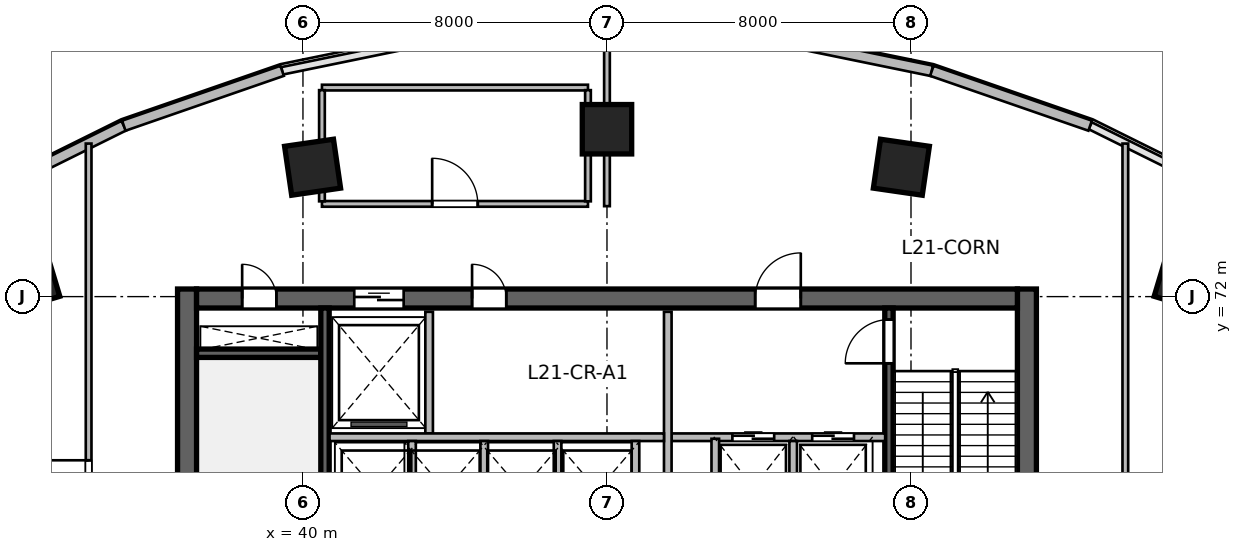
"""IFC4 building model, lengths in metres.
Left out: names, types, materials, properties, quantities, classifications, styles, units other than length and angle.
Written with IfcOpenShell. Run it as: python <this file> out.ifc"""

import sys

from ifc_helpers import new_model, si_unit, direction, frame, frame_2d, origin, origin_2d, place, context, subcontext, project, spatial, rectangle, extrude, source, transform, mapped, element, fill, save


model = new_model("IFC4")
c1 = context("Model", 3, precision=1e-05, world=origin(), true_north=direction((0.0, 1.0)))
c2 = subcontext(c1, "Body", "Model", "MODEL_VIEW")
j1 = project(units=[si_unit("LENGTHUNIT", "METRE"), si_unit("PLANEANGLEUNIT", "RADIAN")], contexts=[c1])
p1 = place(None, origin())
s1 = spatial("IfcSite", under=j1, at=p1, CompositionType="ELEMENT")
p2 = place(p1, origin())
s2 = spatial("IfcBuilding", under=s1, at=p2, CompositionType="ELEMENT")
p3 = place(p2, frame((0.0, 0.0, 91.2)))
s3 = spatial("IfcBuildingStorey", under=s2, at=p3, CompositionType="ELEMENT", Elevation=91.2)
m1 = source(origin(), c2, "Body", "SweptSolid", [
    extrude(rectangle(XDim=12.0, YDim=0.5, at=frame_2d((6.0, 0.0))), origin(), (0.0, 0.0, 1.0), 4.8),
])
for number, where, z_axis, x_axis in (
    (1, (36.95, 60.2, 0.0), (0.0, 0.0, 1.0), (0.0, 1.0, 0.0)),
    (2, (59.05, 60.2, 0.0), (0.0, 0.0, 1.0), (0.0, 1.0, 0.0)),
):
    element("IfcWall", number, at=place(p3, frame(where, z_axis=z_axis, x_axis=x_axis)), inside=s3, PredefinedType="SHEAR", context=c2, shape_type="MappedRepresentation", body=[
        mapped(m1, transform((0.0, 0.0, 0.0), scale=1.0)),
    ])
m2 = source(origin(), c2, "Body", "SweptSolid", [
    extrude(rectangle(XDim=21.6, YDim=0.5, at=frame_2d((10.8, 0.0))), origin(), (0.0, 0.0, 1.0), 4.8),
])
p4 = place(p3, frame((37.2, 71.95, 0.0), z_axis=(0.0, 0.0, 1.0), x_axis=(1.0, 0.0, 0.0)))
e3 = element("IfcWall", 3, at=p4, inside=s3, PredefinedType="SHEAR", context=c2, shape_type="MappedRepresentation", body=[
    mapped(m2, transform((0.0, 0.0, 0.0), scale=1.0)),
])
p5 = place(p4, frame((1.2, 0.0, 0.0)))
e4 = element("IfcOpeningElement", 4, at=p5, cuts=e3, PredefinedType="OPENING", context=c2, shape_type="SweptSolid", body=[
    extrude(rectangle(XDim=0.9, YDim=2.1, at=frame_2d((0.45, 1.05))), frame((0.0, 0.26, 0.0), z_axis=(0.0, -1.0, 0.0), x_axis=(1.0, 0.0, 0.0)), (0.0, 0.0, 1.0), 0.52),
])
p6 = place(p4, frame((14.7, 0.0, 0.0)))
e5 = element("IfcOpeningElement", 5, at=p6, cuts=e3, PredefinedType="OPENING", context=c2, shape_type="SweptSolid", body=[
    extrude(rectangle(XDim=1.2, YDim=2.15, at=frame_2d((0.6, 1.075))), frame((0.0, 0.26, 0.0), z_axis=(0.0, -1.0, 0.0), x_axis=(1.0, 0.0, 0.0)), (0.0, 0.0, 1.0), 0.52),
])
p7 = place(p4, frame((4.15, 0.0, 0.0)))
e6 = element("IfcOpeningElement", 6, at=p7, cuts=e3, PredefinedType="OPENING", context=c2, shape_type="SweptSolid", body=[
    extrude(rectangle(XDim=1.3, YDim=2.15, at=frame_2d((0.65, 1.075))), frame((0.0, 0.26, 0.0), z_axis=(0.0, -1.0, 0.0), x_axis=(1.0, 0.0, 0.0)), (0.0, 0.0, 1.0), 0.52),
])
p8 = place(p4, frame((7.25, 0.0, 0.0)))
e7 = element("IfcOpeningElement", 7, at=p8, cuts=e3, PredefinedType="OPENING", context=c2, shape_type="SweptSolid", body=[
    extrude(rectangle(XDim=0.9, YDim=2.1, at=frame_2d((0.45, 1.05))), frame((0.0, 0.26, 0.0), z_axis=(0.0, -1.0, 0.0), x_axis=(1.0, 0.0, 0.0)), (0.0, 0.0, 1.0), 0.52),
])
m3 = source(origin(), c2, "Body", "SweptSolid", [
    extrude(rectangle(XDim=3.27, YDim=0.22, at=frame_2d((1.635, 0.0))), origin(), (0.0, 0.0, 1.0), 4.8),
])
p9 = place(p3, frame((37.2, 70.51, 0.0), z_axis=(0.0, 0.0, 1.0), x_axis=(1.0, 0.0, 0.0)))
e8 = element("IfcWall", 8, at=p9, inside=s3, PredefinedType="SHEAR", context=c2, shape_type="MappedRepresentation", body=[
    mapped(m3, transform((0.0, 0.0, 0.0), scale=1.0)),
])
m4 = source(origin(), c2, "Body", "SweptSolid", [
    extrude(rectangle(XDim=11.0, YDim=0.22, at=frame_2d((5.5, 0.0))), origin(), (0.0, 0.0, 1.0), 4.8),
])
p10 = place(p3, frame((40.58, 60.7, 0.0), z_axis=(0.0, 0.0, 1.0), x_axis=(0.0, 1.0, 0.0)))
e9 = element("IfcWall", 9, at=p10, inside=s3, PredefinedType="SHEAR", context=c2, shape_type="MappedRepresentation", body=[
    mapped(m4, transform((0.0, 0.0, 0.0), scale=1.0)),
])
p11 = place(p3, frame((55.42, 60.7, 0.0), z_axis=(0.0, 0.0, 1.0), x_axis=(0.0, 1.0, 0.0)))
e10 = element("IfcWall", 10, at=p11, inside=s3, PredefinedType="SHEAR", context=c2, shape_type="MappedRepresentation", body=[
    mapped(m4, transform((0.0, 0.0, 0.0), scale=1.0)),
])
p12 = place(p11, frame((9.545, 0.0, 0.0)))
e11 = element("IfcOpeningElement", 11, at=p12, cuts=e10, PredefinedType="OPENING", context=c2, shape_type="SweptSolid", body=[
    extrude(rectangle(XDim=1.15, YDim=2.15, at=frame_2d((0.575, 1.075))), frame((0.0, 0.12, 0.0), z_axis=(0.0, -1.0, 0.0), x_axis=(1.0, 0.0, 0.0)), (0.0, 0.0, 1.0), 0.24),
])
m5 = source(origin(), c2, "Body", "SweptSolid", [
    extrude(rectangle(XDim=1.3, YDim=1.3, at=origin_2d()), origin(), (0.0, 0.0, 1.0), 4.8),
])
for number, where, z_axis, x_axis in (
    (12, (32.791, 72.442, 0.0), (0.0, 0.0, 1.0), (-0.289, 0.957, 0.0)),
    (13, (40.253, 75.404, 0.0), (0.0, 0.0, 1.0), (-0.143, 0.99, 0.0)),
    (14, (48.0, 76.404, 0.0), (0.0, 0.0, 1.0), (0.0, 1.0, 0.0)),
    (15, (55.747, 75.404, 0.0), (0.0, 0.0, 1.0), (0.143, 0.99, 0.0)),
    (16, (63.209, 72.442, 0.0), (0.0, 0.0, 1.0), (0.289, 0.957, 0.0)),
):
    element("IfcColumn", number, at=place(p3, frame(where, z_axis=z_axis, x_axis=x_axis)), inside=s3, PredefinedType="COLUMN", context=c2, shape_type="MappedRepresentation", body=[
        mapped(m5, transform((0.0, 0.0, 0.0), scale=1.0)),
    ])
m6 = source(origin(), c2, "Body", "SweptSolid", [
    extrude(rectangle(XDim=4.506, YDim=0.28, at=frame_2d((2.253, 0.0))), origin(), (0.0, 0.0, 1.0), 4.55),
])
p13 = place(p3, frame((31.249, 74.496, 0.0), z_axis=(0.0, 0.0, 1.0), x_axis=(0.89597155075, 0.444111450254, 0.0)))
e17 = element("IfcWall", 17, at=p13, inside=s3, PredefinedType="SOLIDWALL", context=c2, shape_type="MappedRepresentation", body=[
    mapped(m6, transform((0.0, 0.0, 0.0), scale=1.0)),
])
m7 = source(origin(), c2, "Body", "SweptSolid", [
    extrude(rectangle(XDim=4.409, YDim=0.28, at=frame_2d((2.205, 0.0))), origin(), (0.0, 0.0, 1.0), 4.55),
])
p14 = place(p3, frame((35.286, 76.497, 0.0), z_axis=(0.0, 0.0, 1.0), x_axis=(0.944879374121, 0.327418643881, 0.0)))
e18 = element("IfcWall", 18, at=p14, inside=s3, PredefinedType="SOLIDWALL", context=c2, shape_type="MappedRepresentation", body=[
    mapped(m7, transform((0.0, 0.0, 0.0), scale=1.0)),
])
m8 = source(origin(), c2, "Body", "SweptSolid", [
    extrude(rectangle(XDim=4.341, YDim=0.28, at=frame_2d((2.17, 0.0))), origin(), (0.0, 0.0, 1.0), 4.55),
])
p15 = place(p3, frame((52.296, 78.813, 0.0), z_axis=(0.0, 0.0, 1.0), x_axis=(0.979612918634, -0.20089432457, 0.0)))
e19 = element("IfcWall", 19, at=p15, inside=s3, PredefinedType="SOLIDWALL", context=c2, shape_type="MappedRepresentation", body=[
    mapped(m8, transform((0.0, 0.0, 0.0), scale=1.0)),
])
p16 = place(p3, frame((56.548, 77.941, 0.0), z_axis=(0.0, 0.0, 1.0), x_axis=(0.944879374121, -0.327418643881, 0.0)))
e20 = element("IfcWall", 20, at=p16, inside=s3, PredefinedType="SOLIDWALL", context=c2, shape_type="MappedRepresentation", body=[
    mapped(m7, transform((0.0, 0.0, 0.0), scale=1.0)),
])
m9 = source(origin(), c2, "Body", "SweptSolid", [
    extrude(rectangle(XDim=5.62, YDim=0.2, at=frame_2d((2.81, 0.0))), origin(), (0.0, 0.0, 1.0), 4.55),
])
p17 = place(p3, frame((49.7, 68.3, 0.0), z_axis=(0.0, 0.0, 1.0), x_axis=(1.0, 0.0, 0.0)))
e21 = element("IfcWall", 21, at=p17, inside=s3, PredefinedType="SOLIDWALL", context=c2, shape_type="MappedRepresentation", body=[
    mapped(m9, transform((0.0, 0.0, 0.0), scale=1.0)),
])
p18 = place(p17, frame((1.6, 0.0, 0.0)))
e22 = element("IfcOpeningElement", 22, at=p18, cuts=e21, PredefinedType="OPENING", context=c2, shape_type="SweptSolid", body=[
    extrude(rectangle(XDim=1.1, YDim=2.15, at=frame_2d((0.55, 1.075))), frame((0.0, 0.11, 0.0), z_axis=(0.0, -1.0, 0.0), x_axis=(1.0, 0.0, 0.0)), (0.0, 0.0, 1.0), 0.22),
])
p19 = place(p17, frame((3.7, 0.0, 0.0)))
e23 = element("IfcOpeningElement", 23, at=p19, cuts=e21, PredefinedType="OPENING", context=c2, shape_type="SweptSolid", body=[
    extrude(rectangle(XDim=1.1, YDim=2.15, at=frame_2d((0.55, 1.075))), frame((0.0, 0.11, 0.0), z_axis=(0.0, -1.0, 0.0), x_axis=(1.0, 0.0, 0.0)), (0.0, 0.0, 1.0), 0.22),
])
m10 = source(origin(), c2, "Body", "SweptSolid", [
    extrude(rectangle(XDim=5.8, YDim=0.2, at=frame_2d((2.9, 0.0))), origin(), (0.0, 0.0, 1.0), 4.55),
])
p20 = place(p3, frame((49.6, 65.8, 0.0), z_axis=(0.0, 0.0, 1.0), x_axis=(0.0, 1.0, 0.0)))
e24 = element("IfcWall", 24, at=p20, inside=s3, PredefinedType="SOLIDWALL", context=c2, shape_type="MappedRepresentation", body=[
    mapped(m10, transform((0.0, 0.0, 0.0), scale=1.0)),
])
m11 = source(origin(), c2, "Body", "SweptSolid", [
    extrude(rectangle(XDim=2.58, YDim=0.2, at=frame_2d((1.29, 0.0))), origin(), (0.0, 0.0, 1.0), 4.55),
])
p21 = place(p3, frame((50.85, 65.68, 0.0), z_axis=(0.0, 0.0, 1.0), x_axis=(0.0, 1.0, 0.0)))
e25 = element("IfcWall", 25, at=p21, inside=s3, PredefinedType="SOLIDWALL", context=c2, shape_type="MappedRepresentation", body=[
    mapped(m11, transform((0.0, 0.0, 0.0), scale=1.0)),
])
m12 = source(origin(), c2, "Body", "SweptSolid", [
    extrude(rectangle(XDim=2.4, YDim=0.2, at=frame_2d((1.2, 0.0))), origin(), (0.0, 0.0, 1.0), 4.55),
])
p22 = place(p3, frame((52.9, 65.8, 0.0), z_axis=(0.0, 0.0, 1.0), x_axis=(0.0, 1.0, 0.0)))
e26 = element("IfcWall", 26, at=p22, inside=s3, PredefinedType="SOLIDWALL", context=c2, shape_type="MappedRepresentation", body=[
    mapped(m12, transform((0.0, 0.0, 0.0), scale=1.0)),
])
m13 = source(origin(), c2, "Body", "SweptSolid", [
    extrude(rectangle(XDim=3.2, YDim=0.2, at=frame_2d((1.6, 0.0))), origin(), (0.0, 0.0, 1.0), 4.55),
])
p23 = place(p3, frame((43.32, 68.4, 0.0), z_axis=(0.0, 0.0, 1.0), x_axis=(0.0, 1.0, 0.0)))
e27 = element("IfcWall", 27, at=p23, inside=s3, PredefinedType="SOLIDWALL", context=c2, shape_type="MappedRepresentation", body=[
    mapped(m13, transform((0.0, 0.0, 0.0), scale=1.0)),
])
m14 = source(origin(), c2, "Body", "SweptSolid", [
    extrude(rectangle(XDim=8.8, YDim=0.2, at=frame_2d((4.4, 0.0))), origin(), (0.0, 0.0, 1.0), 4.55),
])
p24 = place(p3, frame((40.7, 68.3, 0.0), z_axis=(0.0, 0.0, 1.0), x_axis=(1.0, 0.0, 0.0)))
e28 = element("IfcWall", 28, at=p24, inside=s3, PredefinedType="SOLIDWALL", context=c2, shape_type="MappedRepresentation", body=[
    mapped(m14, transform((0.0, 0.0, 0.0), scale=1.0)),
])
for number, where, z_axis, x_axis in (
    (29, (48.75, 65.8, 0.0), (0.0, 0.0, 1.0), (0.0, 1.0, 0.0)),
    (30, (42.87, 65.8, 0.0), (0.0, 0.0, 1.0), (0.0, 1.0, 0.0)),
    (31, (44.77, 65.8, 0.0), (0.0, 0.0, 1.0), (0.0, 1.0, 0.0)),
    (32, (46.7, 65.8, 0.0), (0.0, 0.0, 1.0), (0.0, 1.0, 0.0)),
):
    element("IfcWall", number, at=place(p3, frame(where, z_axis=z_axis, x_axis=x_axis)), inside=s3, PredefinedType="SOLIDWALL", context=c2, shape_type="MappedRepresentation", body=[
        mapped(m12, transform((0.0, 0.0, 0.0), scale=1.0)),
    ])
m15 = source(origin(), c2, "Body", "SweptSolid", [
    extrude(rectangle(XDim=7.0, YDim=0.15, at=frame_2d((3.5, 0.0))), origin(), (0.0, 0.0, 1.0), 4.55),
])
p25 = place(p3, frame((40.5, 74.44, 0.0), z_axis=(0.0, 0.0, 1.0), x_axis=(1.0, 0.0, 0.0)))
e33 = element("IfcWall", 33, at=p25, inside=s3, PredefinedType="PARTITIONING", context=c2, shape_type="MappedRepresentation", body=[
    mapped(m15, transform((0.0, 0.0, 0.0), scale=1.0)),
])
p26 = place(p25, frame((2.9, 0.0, 0.0)))
e34 = element("IfcOpeningElement", 34, at=p26, cuts=e33, PredefinedType="OPENING", context=c2, shape_type="SweptSolid", body=[
    extrude(rectangle(XDim=1.2, YDim=2.15, at=frame_2d((0.6, 1.075))), frame((0.0, 0.085, 0.0), z_axis=(0.0, -1.0, 0.0), x_axis=(1.0, 0.0, 0.0)), (0.0, 0.0, 1.0), 0.17),
])
p27 = place(p3, frame((40.5, 77.5, 0.0), z_axis=(0.0, 0.0, 1.0), x_axis=(1.0, 0.0, 0.0)))
e35 = element("IfcWall", 35, at=p27, inside=s3, PredefinedType="PARTITIONING", context=c2, shape_type="MappedRepresentation", body=[
    mapped(m15, transform((0.0, 0.0, 0.0), scale=1.0)),
])
m16 = source(origin(), c2, "Body", "SweptSolid", [
    extrude(rectangle(XDim=2.925, YDim=0.15, at=frame_2d((1.462, 0.0))), origin(), (0.0, 0.0, 1.0), 4.55),
])
for number, where, z_axis, x_axis in (
    (36, (40.5, 74.508, 0.0), (0.0, 0.0, 1.0), (0.0, 1.0, 0.0)),
    (37, (47.5, 74.508, 0.0), (0.0, 0.0, 1.0), (0.0, 1.0, 0.0)),
):
    element("IfcWall", number, at=place(p3, frame(where, z_axis=z_axis, x_axis=x_axis)), inside=s3, PredefinedType="PARTITIONING", context=c2, shape_type="MappedRepresentation", body=[
        mapped(m16, transform((0.0, 0.0, 0.0), scale=1.0)),
    ])
m17 = source(origin(), c2, "Body", "SweptSolid", [
    extrude(rectangle(XDim=4.715, YDim=0.15, at=frame_2d((2.357, 0.0))), origin(), (0.0, 0.0, 1.0), 3.842),
])
p28 = place(p3, frame((48.0, 74.38, 0.0), z_axis=(0.0, 0.0, 1.0), x_axis=(0.0, 1.0, 0.0)))
e38 = element("IfcWall", 38, at=p28, inside=s3, PredefinedType="PARTITIONING", context=c2, shape_type="MappedRepresentation", body=[
    mapped(m17, transform((0.0, 0.0, 0.0), scale=1.0)),
])
m18 = source(origin(), c2, "Body", "SweptSolid", [
    extrude(rectangle(XDim=18.067, YDim=0.15, at=frame_2d((9.034, 0.0))), origin(), (0.0, 0.0, 1.0), 4.55),
])
p29 = place(p3, frame((34.36, 57.96, 0.0), z_axis=(0.0, 0.0, 1.0), x_axis=(0.0, 1.0, 0.0)))
e39 = element("IfcWall", 39, at=p29, inside=s3, PredefinedType="PARTITIONING", context=c2, shape_type="MappedRepresentation", body=[
    mapped(m18, transform((0.0, 0.0, 0.0), scale=1.0)),
])
p30 = place(p29, frame((8.333, 0.0, 0.0)))
e40 = element("IfcOpeningElement", 40, at=p30, cuts=e39, PredefinedType="OPENING", context=c2, shape_type="SweptSolid", body=[
    extrude(rectangle(XDim=1.4, YDim=2.15, at=frame_2d((0.7, 1.075))), frame((0.0, 0.085, 0.0), z_axis=(0.0, -1.0, 0.0), x_axis=(1.0, 0.0, 0.0)), (0.0, 0.0, 1.0), 0.17),
])
m19 = source(origin(), c2, "Body", "SweptSolid", [
    extrude(rectangle(XDim=10.377, YDim=0.15, at=frame_2d((5.189, 0.0))), origin(), (0.0, 0.0, 1.0), 4.55),
])
p31 = place(p3, frame((61.64, 65.65, 0.0), z_axis=(0.0, 0.0, 1.0), x_axis=(0.0, 1.0, 0.0)))
e41 = element("IfcWall", 41, at=p31, inside=s3, PredefinedType="PARTITIONING", context=c2, shape_type="MappedRepresentation", body=[
    mapped(m19, transform((0.0, 0.0, 0.0), scale=1.0)),
])
m20 = source(origin(), c2, "Body", "SweptSolid", [
    extrude(rectangle(XDim=0.9, YDim=2.1, at=frame_2d((0.45, 1.05))), frame((0.0, 0.025, 0.0), z_axis=(0.0, -1.0, 0.0), x_axis=(1.0, 0.0, 0.0)), (0.0, 0.0, 1.0), 0.05),
])
p32 = place(p5, origin())
e42 = element("IfcDoor", 42, at=p32, inside=s3, OperationType="SINGLE_SWING_LEFT", PredefinedType="DOOR", context=c2, shape_type="MappedRepresentation", body=[
    mapped(m20, transform((0.0, 0.0, 0.0), scale=1.0)),
])
fill(e4, e42)
m21 = source(origin(), c2, "Body", "SweptSolid", [
    extrude(rectangle(XDim=1.15, YDim=2.15, at=frame_2d((0.575, 1.075))), frame((0.0, 0.025, 0.0), z_axis=(0.0, -1.0, 0.0), x_axis=(1.0, 0.0, 0.0)), (0.0, 0.0, 1.0), 0.05),
])
p33 = place(p12, origin())
e43 = element("IfcDoor", 43, at=p33, inside=s3, OperationType="SINGLE_SWING_LEFT", PredefinedType="DOOR", context=c2, shape_type="MappedRepresentation", body=[
    mapped(m21, transform((0.0, 0.0, 0.0), scale=1.0)),
])
fill(e11, e43)
m22 = source(origin(), c2, "Body", "SweptSolid", [
    extrude(rectangle(XDim=1.2, YDim=2.15, at=frame_2d((0.6, 1.075))), frame((0.0, 0.025, 0.0), z_axis=(0.0, -1.0, 0.0), x_axis=(1.0, 0.0, 0.0)), (0.0, 0.0, 1.0), 0.05),
])
p34 = place(p6, origin())
e44 = element("IfcDoor", 44, at=p34, inside=s3, OperationType="SINGLE_SWING_RIGHT", PredefinedType="DOOR", context=c2, shape_type="MappedRepresentation", body=[
    mapped(m22, transform((0.0, 0.0, 0.0), scale=1.0)),
])
fill(e5, e44)
m23 = source(origin(), c2, "Body", "SweptSolid", [
    extrude(rectangle(XDim=1.1, YDim=2.15, at=frame_2d((0.55, 1.075))), frame((0.0, 0.025, 0.0), z_axis=(0.0, -1.0, 0.0), x_axis=(1.0, 0.0, 0.0)), (0.0, 0.0, 1.0), 0.05),
])
p35 = place(p18, origin())
e45 = element("IfcDoor", 45, at=p35, inside=s3, OperationType="DOUBLE_DOOR_SLIDING", PredefinedType="DOOR", context=c2, shape_type="MappedRepresentation", body=[
    mapped(m23, transform((0.0, 0.0, 0.0), scale=1.0)),
])
fill(e22, e45)
p36 = place(p19, origin())
e46 = element("IfcDoor", 46, at=p36, inside=s3, OperationType="DOUBLE_DOOR_SLIDING", PredefinedType="DOOR", context=c2, shape_type="MappedRepresentation", body=[
    mapped(m23, transform((0.0, 0.0, 0.0), scale=1.0)),
])
fill(e23, e46)
m24 = source(origin(), c2, "Body", "SweptSolid", [
    extrude(rectangle(XDim=1.3, YDim=2.15, at=frame_2d((0.65, 1.075))), frame((0.0, 0.025, 0.0), z_axis=(0.0, -1.0, 0.0), x_axis=(1.0, 0.0, 0.0)), (0.0, 0.0, 1.0), 0.05),
])
p37 = place(p7, origin())
e47 = element("IfcDoor", 47, at=p37, inside=s3, OperationType="DOUBLE_DOOR_SLIDING", PredefinedType="DOOR", context=c2, shape_type="MappedRepresentation", body=[
    mapped(m24, transform((0.0, 0.0, 0.0), scale=1.0)),
])
fill(e6, e47)
p38 = place(p8, origin())
e48 = element("IfcDoor", 48, at=p38, inside=s3, OperationType="SINGLE_SWING_LEFT", PredefinedType="DOOR", context=c2, shape_type="MappedRepresentation", body=[
    mapped(m20, transform((0.0, 0.0, 0.0), scale=1.0)),
])
fill(e7, e48)
m25 = source(origin(), c2, "Body", "SweptSolid", [
    extrude(rectangle(XDim=1.2, YDim=2.15, at=frame_2d((0.6, 1.075))), frame((0.0, 0.025, 0.0), z_axis=(0.0, -1.0, 0.0), x_axis=(1.0, 0.0, 0.0)), (0.0, 0.0, 1.0), 0.05),
])
p39 = place(p26, origin())
e49 = element("IfcDoor", 49, at=p39, inside=s3, OperationType="SINGLE_SWING_LEFT", PredefinedType="DOOR", context=c2, shape_type="MappedRepresentation", body=[
    mapped(m25, transform((0.0, 0.0, 0.0), scale=1.0)),
])
fill(e34, e49)
m26 = source(origin(), c2, "Body", "SweptSolid", [
    extrude(rectangle(XDim=1.4, YDim=2.15, at=frame_2d((0.7, 1.075))), frame((0.0, 0.025, 0.0), z_axis=(0.0, -1.0, 0.0), x_axis=(1.0, 0.0, 0.0)), (0.0, 0.0, 1.0), 0.05),
])
p40 = place(p30, origin())
e50 = element("IfcDoor", 50, at=p40, inside=s3, OperationType="SINGLE_SWING_RIGHT", PredefinedType="DOOR", context=c2, shape_type="MappedRepresentation", body=[
    mapped(m26, transform((0.0, 0.0, 0.0), scale=1.0)),
])
fill(e40, e50)
save(model, sys.argv[1])
